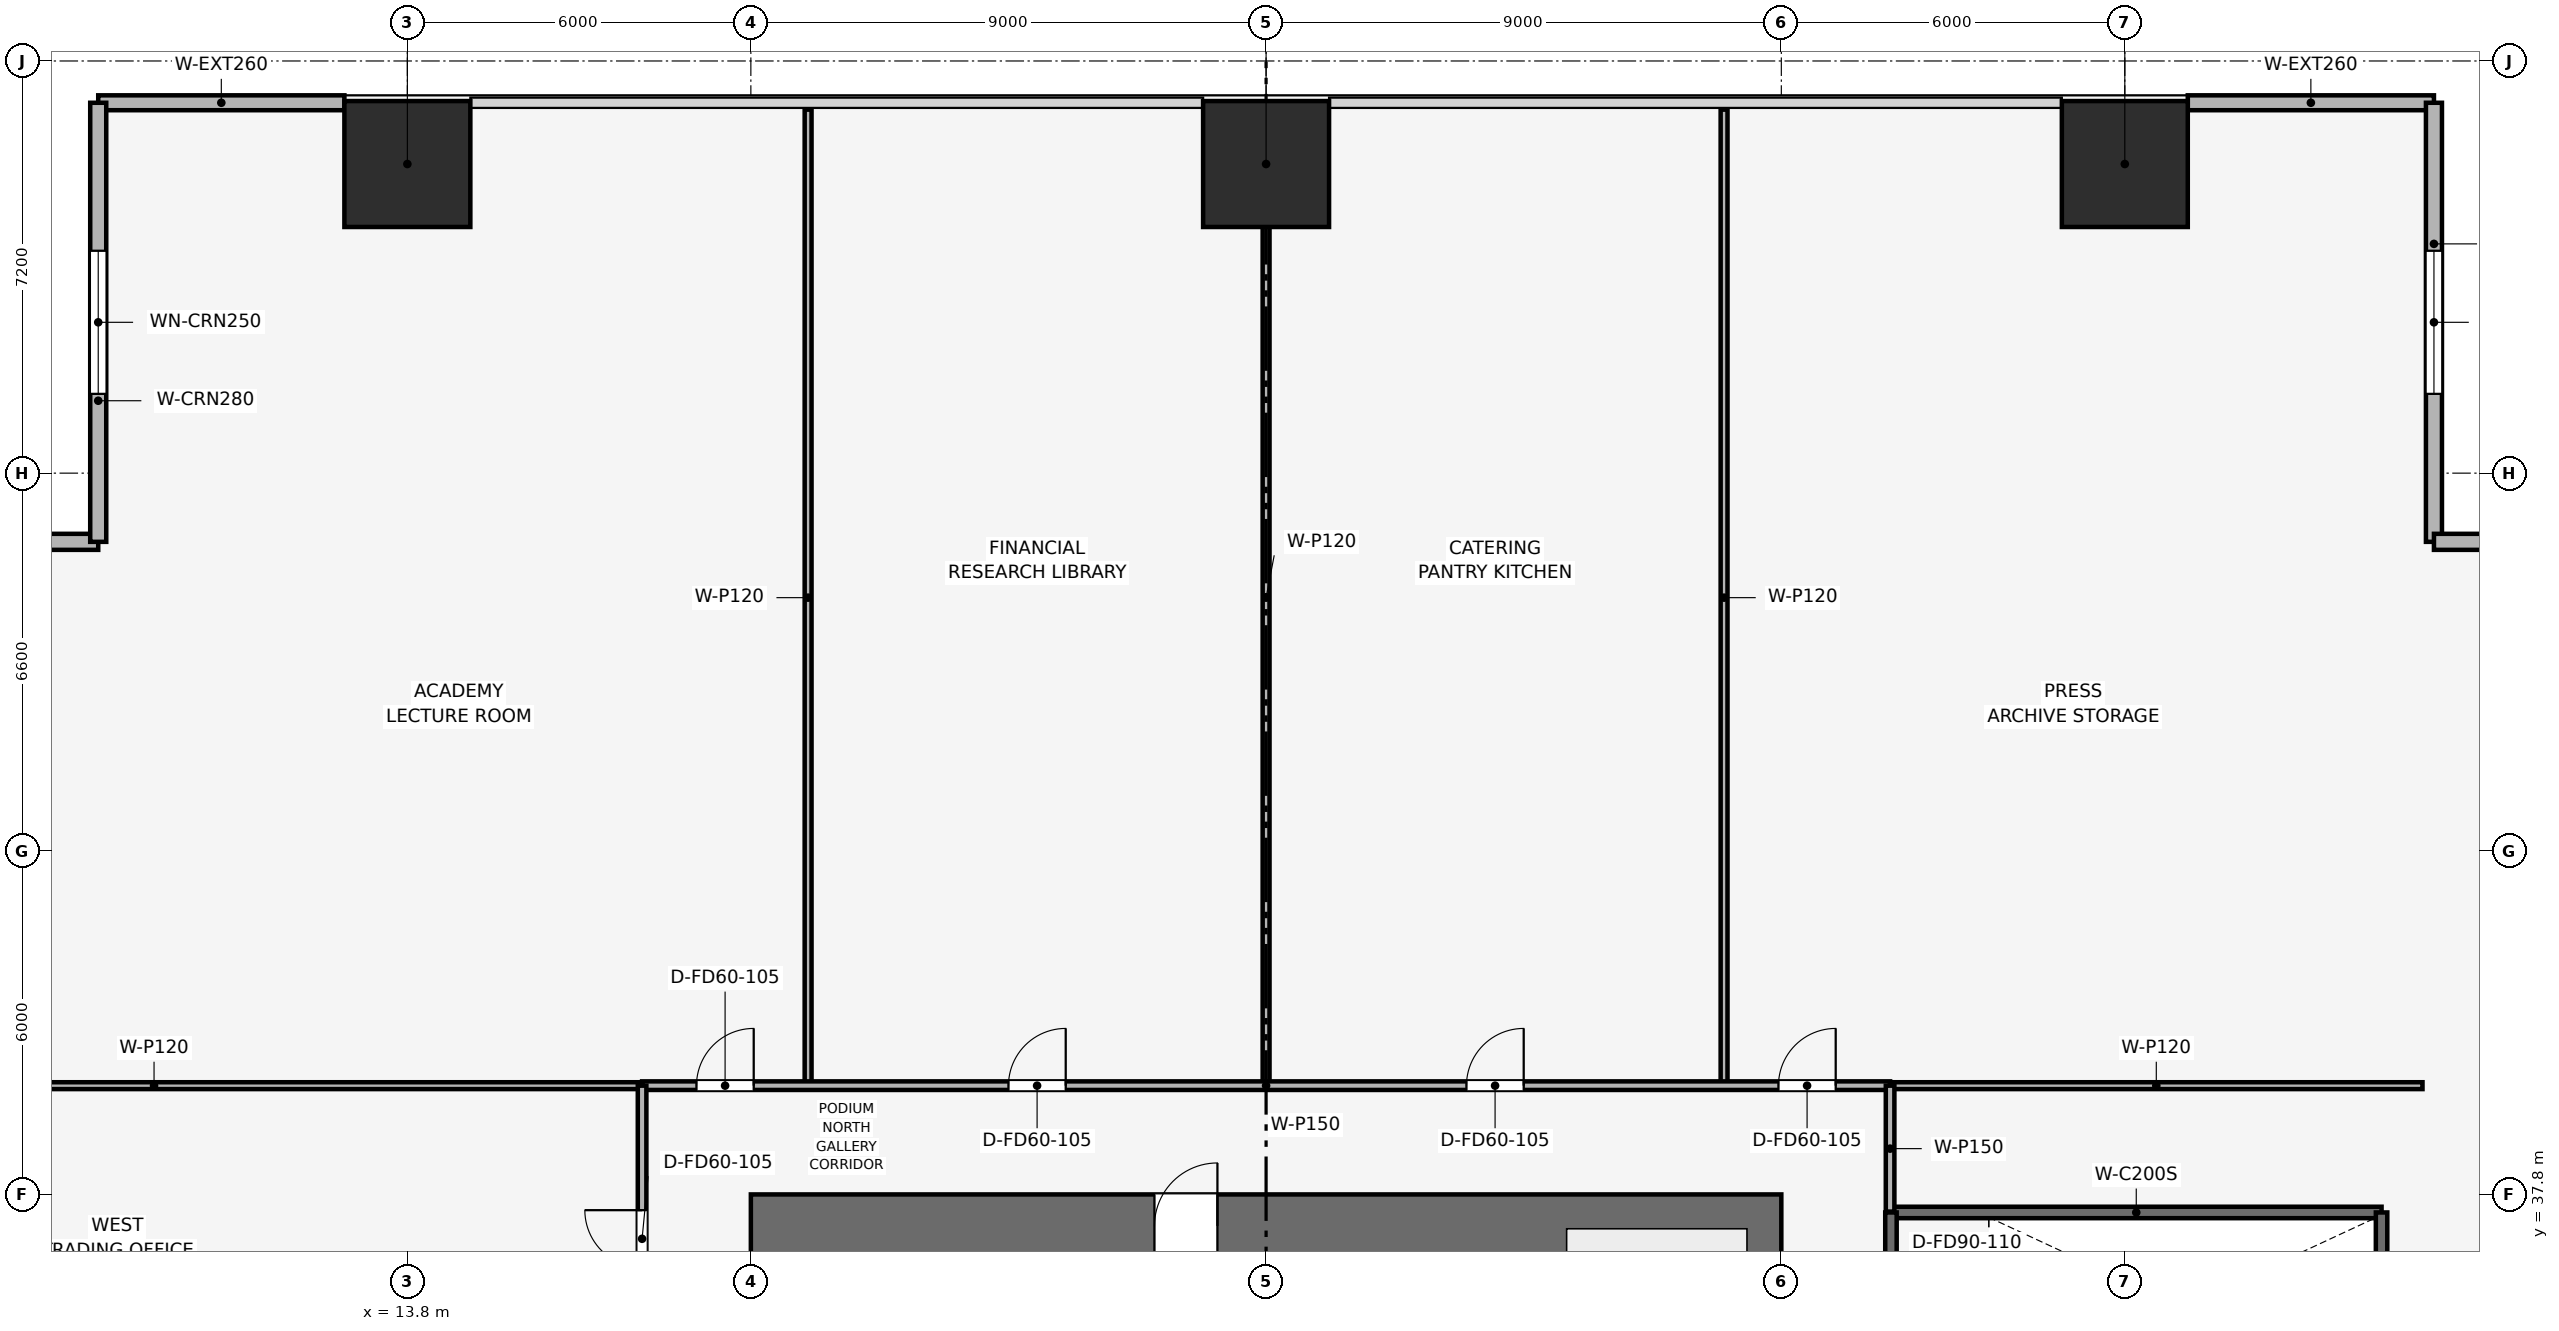
"""IFC4 building model, lengths in metres.
Left out: names, types, materials, properties, quantities, classifications, styles, units other than length and angle.
Written with IfcOpenShell. Run it as: python <this file> out.ifc"""

import sys

from ifc_helpers import new_model, si_unit, direction, frame, frame_2d, origin, origin_2d, place, context, subcontext, project, spatial, rectangle, extrude, element, fill, save


model = new_model("IFC4")
c1 = context("Model", 3, precision=1e-05, world=origin(), true_north=direction((0.0, 1.0)))
c2 = subcontext(c1, "Body", "Model", "MODEL_VIEW")
j1 = project(units=[si_unit("LENGTHUNIT", "METRE"), si_unit("PLANEANGLEUNIT", "RADIAN")], contexts=[c1])
p1 = place(None, origin())
s1 = spatial("IfcSite", under=j1, at=p1, CompositionType="ELEMENT")
p2 = place(p1, origin())
s2 = spatial("IfcBuilding", under=s1, at=p2, CompositionType="ELEMENT")
p3 = place(p2, frame((0.0, 0.0, 19.2)))
s3 = spatial("IfcBuildingStorey", under=s2, at=p3, CompositionType="ELEMENT", Elevation=19.2)
p4 = place(p3, frame((19.8, 37.25, 0.0), z_axis=(0.0, 0.0, 1.0), x_axis=(1.0, 0.0, 0.0)))
e1 = element("IfcWall", 1, at=p4, inside=s3, PredefinedType="SHEAR", context=c2, shape_type="SweptSolid", body=[
    extrude(rectangle(XDim=18.0, YDim=1.1, at=frame_2d((9.0, 0.0))), origin(), (0.0, 0.0, 1.0), 4.8),
])
p5 = place(p4, frame((7.05, 0.0, 0.0)))
e2 = element("IfcOpeningElement", 2, at=p5, cuts=e1, PredefinedType="OPENING", context=c2, shape_type="SweptSolid", body=[
    extrude(rectangle(XDim=1.1, YDim=2.15, at=frame_2d((0.55, 1.075))), frame((0.0, 0.56, 0.0), z_axis=(0.0, -1.0, 0.0), x_axis=(1.0, 0.0, 0.0)), (0.0, 0.0, 1.0), 1.12),
])
for number, where, z_axis, x_axis in (
    (3, (43.8, 55.8, 0.002), (0.0, 0.0, 1.0), (1.0, 0.0, 0.0)),
    (4, (28.8, 55.8, 0.002), (0.0, 0.0, 1.0), (1.0, 0.0, 0.0)),
    (5, (13.8, 55.8, 0.002), (0.0, 0.0, 1.0), (1.0, 0.0, 0.0)),
):
    element("IfcColumn", number, at=place(p3, frame(where, z_axis=z_axis, x_axis=x_axis)), inside=s3, PredefinedType="PILASTER", context=c2, shape_type="SweptSolid", body=[
        extrude(rectangle(XDim=2.2, YDim=2.2, at=origin_2d()), origin(), (0.0, 0.0, 1.0), 4.344),
    ])
for number, where, z_axis, x_axis in (
    (6, (8.4, 56.87, 0.0), (0.0, 0.0, 1.0), (1.0, 0.0, 0.0)),
    (7, (44.9, 56.87, 0.0), (0.0, 0.0, 1.0), (1.0, 0.0, 0.0)),
):
    element("IfcWall", number, at=place(p3, frame(where, z_axis=z_axis, x_axis=x_axis)), inside=s3, PredefinedType="SOLIDWALL", context=c2, shape_type="SweptSolid", body=[
        extrude(rectangle(XDim=4.3, YDim=0.26, at=frame_2d((2.15, 0.0))), origin(), (0.0, 0.0, 1.0), 4.35),
    ])
p6 = place(p3, frame((0.73, 49.2, 0.0), z_axis=(0.0, 0.0, 1.0), x_axis=(1.0, 0.0, 0.0)))
e8 = element("IfcWall", 8, at=p6, inside=s3, PredefinedType="SOLIDWALL", context=c2, shape_type="SweptSolid", body=[
    extrude(rectangle(XDim=7.67, YDim=0.28, at=frame_2d((3.835, 0.0))), origin(), (0.0, 0.0, 1.0), 4.35),
])
p7 = place(p6, frame((2.585, 0.0, 0.9)))
e9 = element("IfcOpeningElement", 9, at=p7, cuts=e8, PredefinedType="OPENING", context=c2, shape_type="SweptSolid", body=[
    extrude(rectangle(XDim=2.5, YDim=1.9, at=frame_2d((1.25, 0.95))), frame((0.0, 0.15, 0.0), z_axis=(0.0, -1.0, 0.0), x_axis=(1.0, 0.0, 0.0)), (0.0, 0.0, 1.0), 0.3),
])
p8 = place(p3, frame((8.4, 49.2, 0.0), z_axis=(0.0, 0.0, 1.0), x_axis=(0.0, 1.0, 0.0)))
e10 = element("IfcWall", 10, at=p8, inside=s3, PredefinedType="SOLIDWALL", context=c2, shape_type="SweptSolid", body=[
    extrude(rectangle(XDim=7.67, YDim=0.28, at=frame_2d((3.835, 0.0))), origin(), (0.0, 0.0, 1.0), 4.35),
])
p9 = place(p8, frame((2.585, 0.0, 0.9)))
e11 = element("IfcOpeningElement", 11, at=p9, cuts=e10, PredefinedType="OPENING", context=c2, shape_type="SweptSolid", body=[
    extrude(rectangle(XDim=2.5, YDim=1.9, at=frame_2d((1.25, 0.95))), frame((0.0, 0.15, 0.0), z_axis=(0.0, -1.0, 0.0), x_axis=(1.0, 0.0, 0.0)), (0.0, 0.0, 1.0), 0.3),
])
p10 = place(p3, frame((49.2, 56.87, 0.0), z_axis=(0.0, 0.0, 1.0), x_axis=(0.0, -1.0, 0.0)))
e12 = element("IfcWall", 12, at=p10, inside=s3, PredefinedType="SOLIDWALL", context=c2, shape_type="SweptSolid", body=[
    extrude(rectangle(XDim=7.67, YDim=0.28, at=frame_2d((3.835, 0.0))), origin(), (0.0, 0.0, 1.0), 4.35),
])
p11 = place(p10, frame((2.585, 0.0, 0.9)))
e13 = element("IfcOpeningElement", 13, at=p11, cuts=e12, PredefinedType="OPENING", context=c2, shape_type="SweptSolid", body=[
    extrude(rectangle(XDim=2.5, YDim=1.9, at=frame_2d((1.25, 0.95))), frame((0.0, 0.15, 0.0), z_axis=(0.0, -1.0, 0.0), x_axis=(1.0, 0.0, 0.0)), (0.0, 0.0, 1.0), 0.3),
])
p12 = place(p3, frame((49.2, 49.2, 0.0), z_axis=(0.0, 0.0, 1.0), x_axis=(1.0, 0.0, 0.0)))
e14 = element("IfcWall", 14, at=p12, inside=s3, PredefinedType="SOLIDWALL", context=c2, shape_type="SweptSolid", body=[
    extrude(rectangle(XDim=7.67, YDim=0.28, at=frame_2d((3.835, 0.0))), origin(), (0.0, 0.0, 1.0), 4.35),
])
p13 = place(p12, frame((2.585, 0.0, 0.9)))
e15 = element("IfcOpeningElement", 15, at=p13, cuts=e14, PredefinedType="OPENING", context=c2, shape_type="SweptSolid", body=[
    extrude(rectangle(XDim=2.5, YDim=1.9, at=frame_2d((1.25, 0.95))), frame((0.0, 0.15, 0.0), z_axis=(0.0, -1.0, 0.0), x_axis=(1.0, 0.0, 0.0)), (0.0, 0.0, 1.0), 0.3),
])
p14 = place(p3, frame((39.715, 37.485, 0.0), z_axis=(0.0, 0.0, 1.0), x_axis=(1.0, 0.0, 0.0)))
e16 = element("IfcWall", 16, at=p14, inside=s3, PredefinedType="SHEAR", context=c2, shape_type="SweptSolid", body=[
    extrude(rectangle(XDim=8.57, YDim=0.2, at=frame_2d((4.285, 0.0))), origin(), (0.0, 0.0, 1.0), 4.35),
])
p15 = place(p3, frame((48.285, 34.165, 0.0), z_axis=(0.0, 0.0, 1.0), x_axis=(0.0, 1.0, 0.0)))
e17 = element("IfcWall", 17, at=p15, inside=s3, PredefinedType="SHEAR", context=c2, shape_type="SweptSolid", body=[
    extrude(rectangle(XDim=3.32, YDim=0.2, at=frame_2d((1.66, 0.0))), origin(), (0.0, 0.0, 1.0), 4.35),
])
p16 = place(p3, frame((39.715, 34.165, 0.0), z_axis=(0.0, 0.0, 1.0), x_axis=(0.0, 1.0, 0.0)))
e18 = element("IfcWall", 18, at=p16, inside=s3, PredefinedType="SHEAR", context=c2, shape_type="SweptSolid", body=[
    extrude(rectangle(XDim=3.32, YDim=0.2, at=frame_2d((1.66, 0.0))), origin(), (0.0, 0.0, 1.0), 4.35),
])
p17 = place(p16, frame((0.9, 0.0, 0.0)))
e19 = element("IfcOpeningElement", 19, at=p17, cuts=e18, PredefinedType="OPENING", context=c2, shape_type="SweptSolid", body=[
    extrude(rectangle(XDim=1.1, YDim=2.15, at=frame_2d((0.55, 1.075))), frame((0.0, 0.11, 0.0), z_axis=(0.0, -1.0, 0.0), x_axis=(1.0, 0.0, 0.0)), (0.0, 0.0, 1.0), 0.22),
])
for number, where, z_axis, x_axis in (
    (20, (20.8, 39.7, 0.0), (0.0, 0.0, 1.0), (0.0, 1.0, 0.0)),
    (21, (28.8, 39.7, 0.0), (0.0, 0.0, 1.0), (0.0, 1.0, 0.0)),
    (22, (36.8, 39.7, 0.0), (0.0, 0.0, 1.0), (0.0, 1.0, 0.0)),
):
    element("IfcWall", number, at=place(p3, frame(where, z_axis=z_axis, x_axis=x_axis)), inside=s3, PredefinedType="PARTITIONING", context=c2, shape_type="SweptSolid", body=[
        extrude(rectangle(XDim=17.05, YDim=0.12, at=frame_2d((8.525, 0.0))), origin(), (0.0, 0.0, 1.0), 3.335),
    ])
p18 = place(p3, frame((0.85, 39.7, 0.0), z_axis=(0.0, 0.0, 1.0), x_axis=(1.0, 0.0, 0.0)))
e23 = element("IfcWall", 23, at=p18, inside=s3, PredefinedType="PARTITIONING", context=c2, shape_type="SweptSolid", body=[
    extrude(rectangle(XDim=17.05, YDim=0.12, at=frame_2d((8.525, 0.0))), origin(), (0.0, 0.0, 1.0), 3.335),
])
p19 = place(p3, frame((39.7, 39.7, 0.0), z_axis=(0.0, 0.0, 1.0), x_axis=(1.0, 0.0, 0.0)))
e24 = element("IfcWall", 24, at=p19, inside=s3, PredefinedType="PARTITIONING", context=c2, shape_type="SweptSolid", body=[
    extrude(rectangle(XDim=9.3, YDim=0.12, at=frame_2d((4.65, 0.0))), origin(), (0.0, 0.0, 1.0), 4.35),
])
p20 = place(p3, frame((17.9, 39.7, 0.0), z_axis=(0.0, 0.0, 1.0), x_axis=(1.0, 0.0, 0.0)))
e25 = element("IfcWall", 25, at=p20, inside=s3, PredefinedType="PARTITIONING", context=c2, shape_type="SweptSolid", body=[
    extrude(rectangle(XDim=21.8, YDim=0.15, at=frame_2d((10.9, 0.0))), origin(), (0.0, 0.0, 1.0), 3.435),
])
p21 = place(p20, frame((0.95, 0.0, 0.0)))
e26 = element("IfcOpeningElement", 26, at=p21, cuts=e25, PredefinedType="OPENING", context=c2, shape_type="SweptSolid", body=[
    extrude(rectangle(XDim=1.0, YDim=2.15, at=frame_2d((0.5, 1.075))), frame((0.0, 0.085, 0.0), z_axis=(0.0, -1.0, 0.0), x_axis=(1.0, 0.0, 0.0)), (0.0, 0.0, 1.0), 0.17),
])
p22 = place(p20, frame((6.4, 0.0, 0.0)))
e27 = element("IfcOpeningElement", 27, at=p22, cuts=e25, PredefinedType="OPENING", context=c2, shape_type="SweptSolid", body=[
    extrude(rectangle(XDim=1.0, YDim=2.15, at=frame_2d((0.5, 1.075))), frame((0.0, 0.085, 0.0), z_axis=(0.0, -1.0, 0.0), x_axis=(1.0, 0.0, 0.0)), (0.0, 0.0, 1.0), 0.17),
])
p23 = place(p20, frame((14.4, 0.0, 0.0)))
e28 = element("IfcOpeningElement", 28, at=p23, cuts=e25, PredefinedType="OPENING", context=c2, shape_type="SweptSolid", body=[
    extrude(rectangle(XDim=1.0, YDim=2.15, at=frame_2d((0.5, 1.075))), frame((0.0, 0.085, 0.0), z_axis=(0.0, -1.0, 0.0), x_axis=(1.0, 0.0, 0.0)), (0.0, 0.0, 1.0), 0.17),
])
p24 = place(p20, frame((19.85, 0.0, 0.0)))
e29 = element("IfcOpeningElement", 29, at=p24, cuts=e25, PredefinedType="OPENING", context=c2, shape_type="SweptSolid", body=[
    extrude(rectangle(XDim=1.0, YDim=2.15, at=frame_2d((0.5, 1.075))), frame((0.0, 0.085, 0.0), z_axis=(0.0, -1.0, 0.0), x_axis=(1.0, 0.0, 0.0)), (0.0, 0.0, 1.0), 0.17),
])
p25 = place(p3, frame((17.9, 23.45, 0.0), z_axis=(0.0, 0.0, 1.0), x_axis=(0.0, 1.0, 0.0)))
e30 = element("IfcWall", 30, at=p25, inside=s3, PredefinedType="PARTITIONING", context=c2, shape_type="SweptSolid", body=[
    extrude(rectangle(XDim=16.25, YDim=0.15, at=frame_2d((8.125, 0.0))), origin(), (0.0, 0.0, 1.0), 3.435),
])
p26 = place(p25, frame((1.9, 0.0, 0.0)))
e31 = element("IfcOpeningElement", 31, at=p26, cuts=e30, PredefinedType="OPENING", context=c2, shape_type="SweptSolid", body=[
    extrude(rectangle(XDim=0.9, YDim=2.1, at=frame_2d((0.45, 1.05))), frame((0.0, 0.085, 0.0), z_axis=(0.0, -1.0, 0.0), x_axis=(1.0, 0.0, 0.0)), (0.0, 0.0, 1.0), 0.17),
])
p27 = place(p25, frame((5.6, 0.0, 0.0)))
e32 = element("IfcOpeningElement", 32, at=p27, cuts=e30, PredefinedType="OPENING", context=c2, shape_type="SweptSolid", body=[
    extrude(rectangle(XDim=0.9, YDim=2.1, at=frame_2d((0.45, 1.05))), frame((0.0, 0.085, 0.0), z_axis=(0.0, -1.0, 0.0), x_axis=(1.0, 0.0, 0.0)), (0.0, 0.0, 1.0), 0.17),
])
p28 = place(p25, frame((8.85, 0.0, 0.0)))
e33 = element("IfcOpeningElement", 33, at=p28, cuts=e30, PredefinedType="OPENING", context=c2, shape_type="SweptSolid", body=[
    extrude(rectangle(XDim=0.95, YDim=2.1, at=frame_2d((0.475, 1.05))), frame((0.0, 0.085, 0.0), z_axis=(0.0, -1.0, 0.0), x_axis=(1.0, 0.0, 0.0)), (0.0, 0.0, 1.0), 0.17),
])
p29 = place(p25, frame((13.075, 0.0, 0.0)))
e34 = element("IfcOpeningElement", 34, at=p29, cuts=e30, PredefinedType="OPENING", context=c2, shape_type="SweptSolid", body=[
    extrude(rectangle(XDim=1.0, YDim=2.15, at=frame_2d((0.5, 1.075))), frame((0.0, 0.085, 0.0), z_axis=(0.0, -1.0, 0.0), x_axis=(1.0, 0.0, 0.0)), (0.0, 0.0, 1.0), 0.17),
])
p30 = place(p3, frame((39.7, 37.5, 0.0), z_axis=(0.0, 0.0, 1.0), x_axis=(0.0, 1.0, 0.0)))
e35 = element("IfcWall", 35, at=p30, inside=s3, PredefinedType="PARTITIONING", context=c2, shape_type="SweptSolid", body=[
    extrude(rectangle(XDim=2.2, YDim=0.15, at=frame_2d((1.1, 0.0))), origin(), (0.0, 0.0, 1.0), 4.35),
])
p31 = place(p9, origin())
e36 = element("IfcWindow", 36, at=p31, inside=s3, PartitioningType="SINGLE_PANEL", PredefinedType="WINDOW", context=c2, shape_type="SweptSolid", body=[
    extrude(rectangle(XDim=2.5, YDim=1.9, at=frame_2d((1.25, 0.95))), frame((0.0, 0.03, 0.0), z_axis=(0.0, -1.0, 0.0), x_axis=(1.0, 0.0, 0.0)), (0.0, 0.0, 1.0), 0.06),
])
fill(e11, e36)
p32 = place(p11, origin())
e37 = element("IfcWindow", 37, at=p32, inside=s3, PartitioningType="SINGLE_PANEL", PredefinedType="WINDOW", context=c2, shape_type="SweptSolid", body=[
    extrude(rectangle(XDim=2.5, YDim=1.9, at=frame_2d((1.25, 0.95))), frame((0.0, 0.03, 0.0), z_axis=(0.0, -1.0, 0.0), x_axis=(1.0, 0.0, 0.0)), (0.0, 0.0, 1.0), 0.06),
])
fill(e13, e37)
p33 = place(p21, origin())
e38 = element("IfcDoor", 38, at=p33, inside=s3, OperationType="SINGLE_SWING_RIGHT", PredefinedType="DOOR", context=c2, shape_type="SweptSolid", body=[
    extrude(rectangle(XDim=1.0, YDim=2.15, at=frame_2d((0.5, 1.075))), frame((0.0, 0.025, 0.0), z_axis=(0.0, -1.0, 0.0), x_axis=(1.0, 0.0, 0.0)), (0.0, 0.0, 1.0), 0.05),
])
fill(e26, e38)
p34 = place(p22, origin())
e39 = element("IfcDoor", 39, at=p34, inside=s3, OperationType="SINGLE_SWING_RIGHT", PredefinedType="DOOR", context=c2, shape_type="SweptSolid", body=[
    extrude(rectangle(XDim=1.0, YDim=2.15, at=frame_2d((0.5, 1.075))), frame((0.0, 0.025, 0.0), z_axis=(0.0, -1.0, 0.0), x_axis=(1.0, 0.0, 0.0)), (0.0, 0.0, 1.0), 0.05),
])
fill(e27, e39)
p35 = place(p23, origin())
e40 = element("IfcDoor", 40, at=p35, inside=s3, OperationType="SINGLE_SWING_RIGHT", PredefinedType="DOOR", context=c2, shape_type="SweptSolid", body=[
    extrude(rectangle(XDim=1.0, YDim=2.15, at=frame_2d((0.5, 1.075))), frame((0.0, 0.025, 0.0), z_axis=(0.0, -1.0, 0.0), x_axis=(1.0, 0.0, 0.0)), (0.0, 0.0, 1.0), 0.05),
])
fill(e28, e40)
p36 = place(p24, origin())
e41 = element("IfcDoor", 41, at=p36, inside=s3, OperationType="SINGLE_SWING_RIGHT", PredefinedType="DOOR", context=c2, shape_type="SweptSolid", body=[
    extrude(rectangle(XDim=1.0, YDim=2.15, at=frame_2d((0.5, 1.075))), frame((0.0, 0.025, 0.0), z_axis=(0.0, -1.0, 0.0), x_axis=(1.0, 0.0, 0.0)), (0.0, 0.0, 1.0), 0.05),
])
fill(e29, e41)
p37 = place(p29, origin())
e42 = element("IfcDoor", 42, at=p37, inside=s3, OperationType="SINGLE_SWING_RIGHT", PredefinedType="DOOR", context=c2, shape_type="SweptSolid", body=[
    extrude(rectangle(XDim=1.0, YDim=2.15, at=frame_2d((0.5, 1.075))), frame((0.0, 0.025, 0.0), z_axis=(0.0, -1.0, 0.0), x_axis=(1.0, 0.0, 0.0)), (0.0, 0.0, 1.0), 0.05),
])
fill(e34, e42)
p38 = place(p5, origin())
e43 = element("IfcDoor", 43, at=p38, inside=s3, OperationType="SINGLE_SWING_RIGHT", PredefinedType="DOOR", context=c2, shape_type="SweptSolid", body=[
    extrude(rectangle(XDim=1.1, YDim=2.15, at=frame_2d((0.55, 1.075))), frame((0.0, 0.025, 0.0), z_axis=(0.0, -1.0, 0.0), x_axis=(1.0, 0.0, 0.0)), (0.0, 0.0, 1.0), 0.05),
])
fill(e2, e43)
save(model, sys.argv[1])
